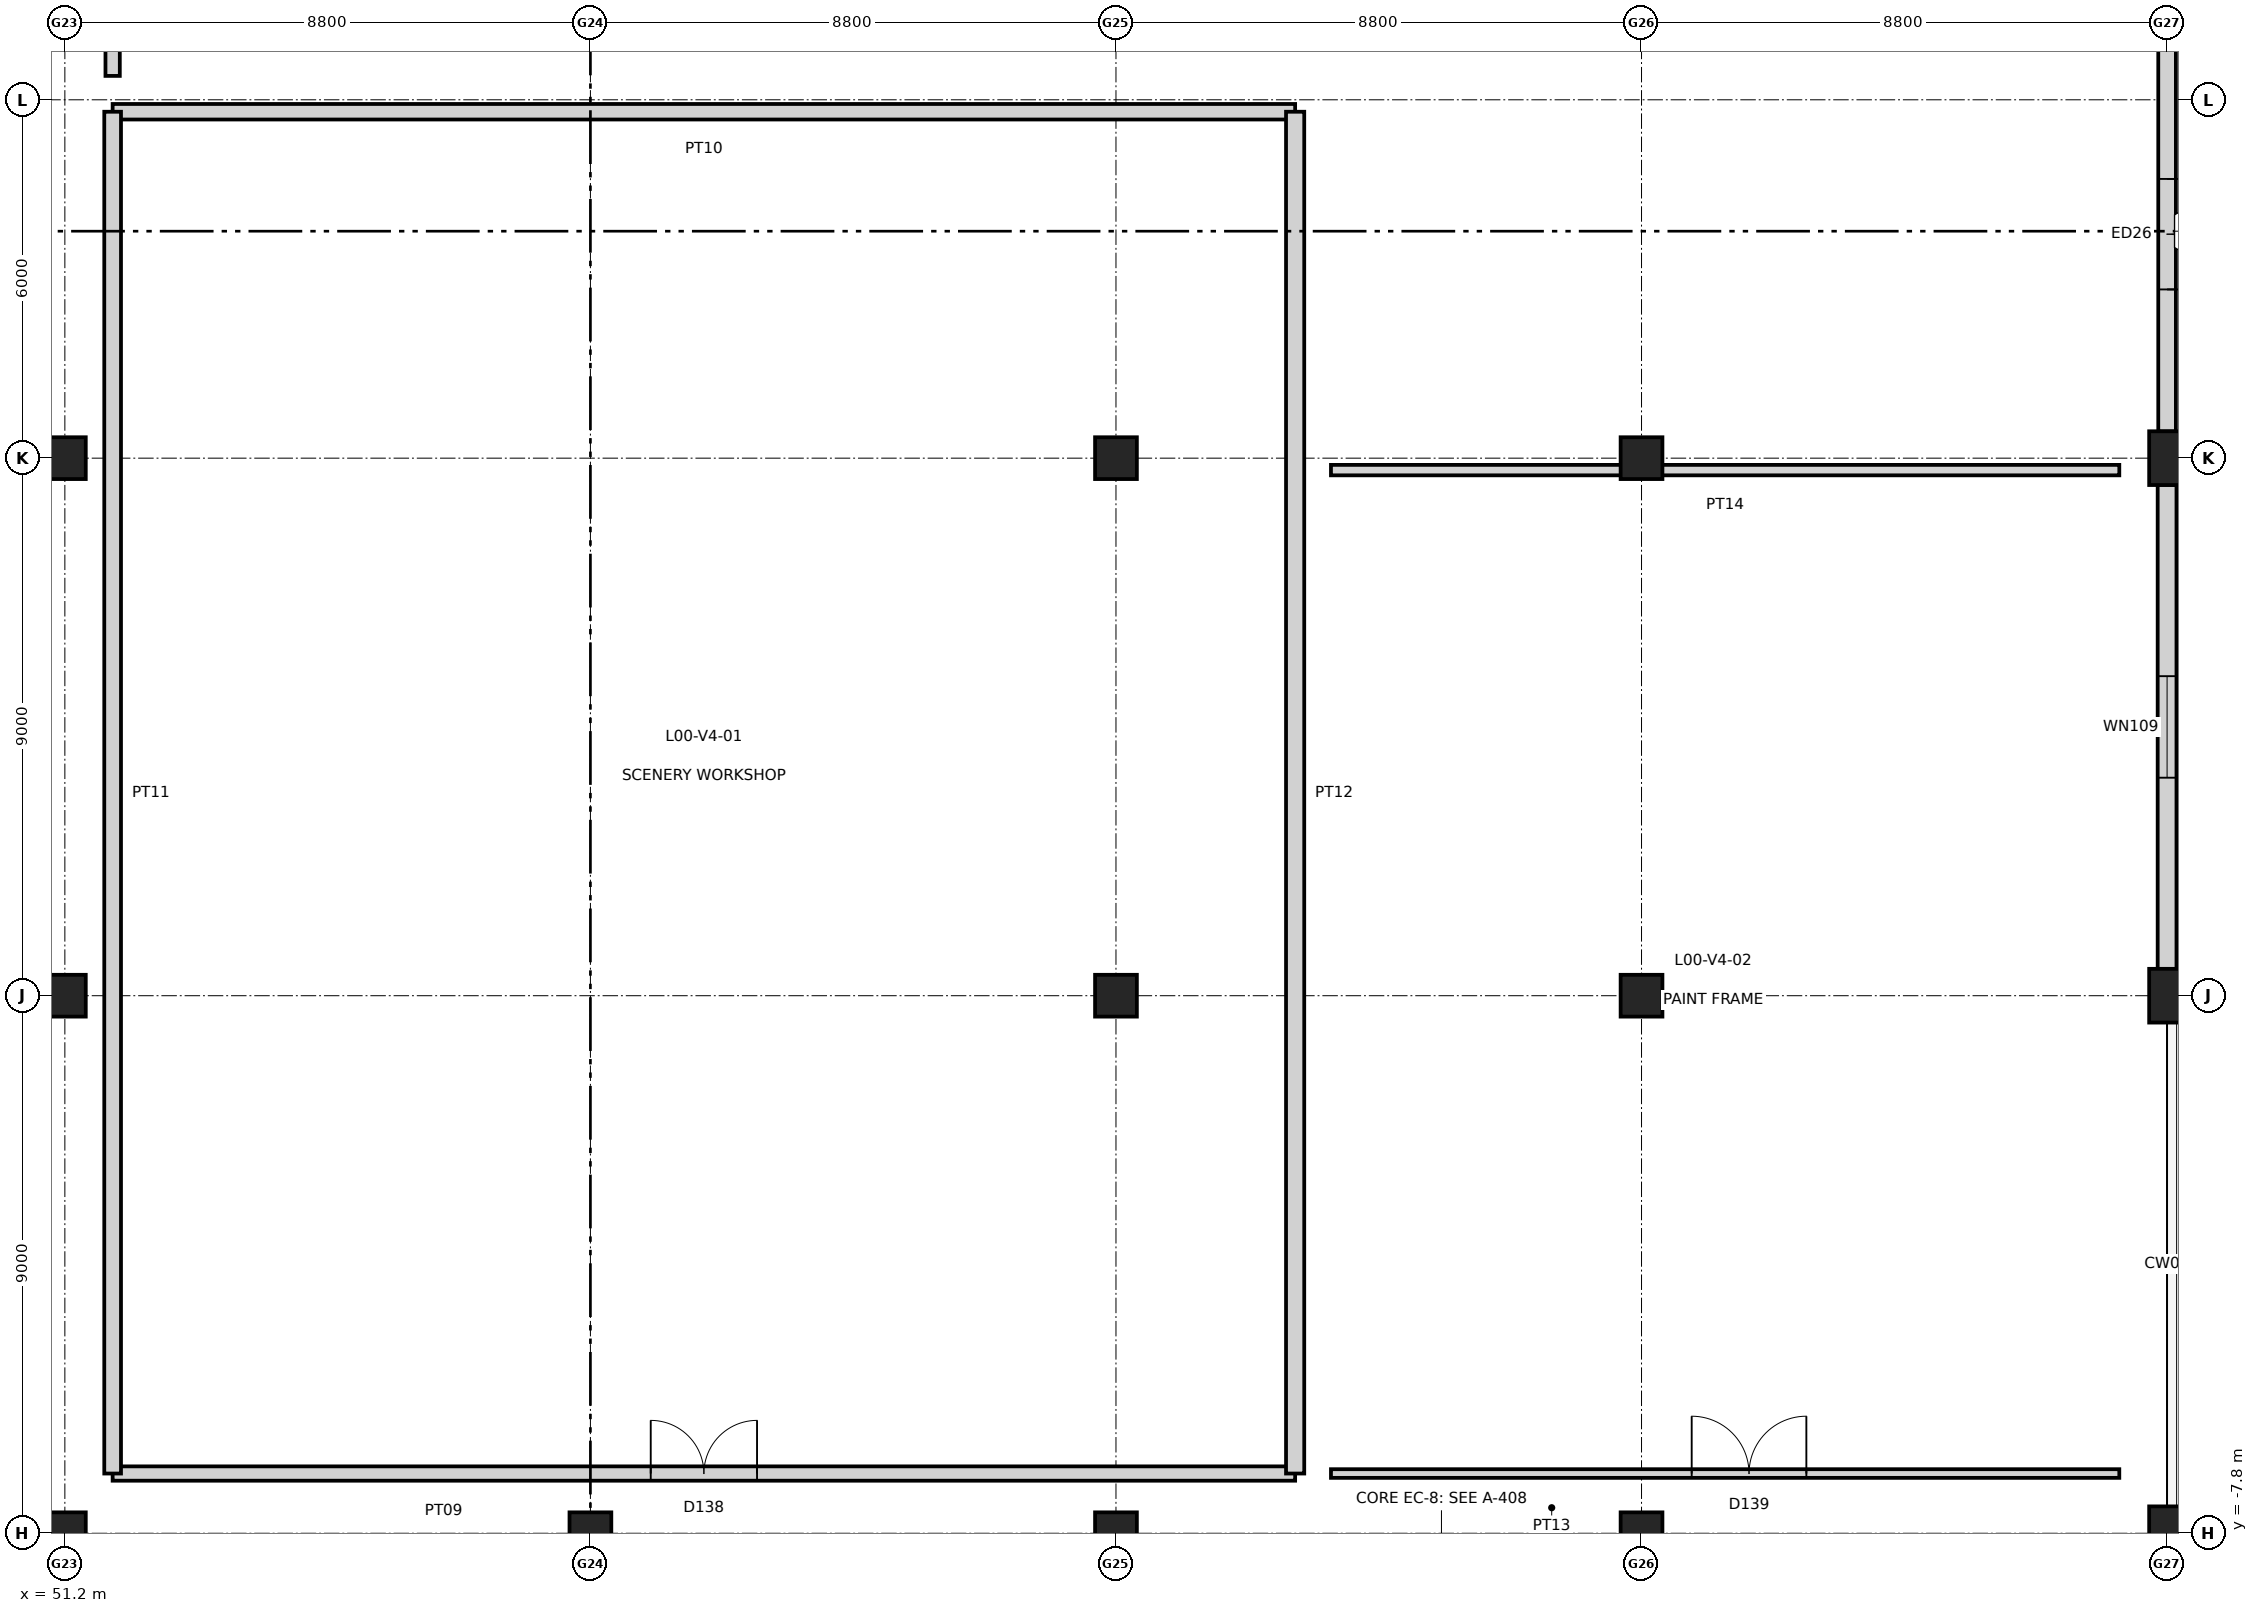
"""IFC4 building model, lengths in metres.
Left out: names, types, materials, properties, quantities, classifications, styles, units other than length and angle.
Written with IfcOpenShell. Run it as: python <this file> out.ifc"""

import sys

from ifc_helpers import new_model, si_unit, direction, frame, frame_2d, origin, origin_2d, place, context, subcontext, project, spatial, rectangle, extrude, element, fill, save


model = new_model("IFC4")
c1 = context("Model", 3, precision=1e-05, world=origin(), true_north=direction((0.0, 1.0)))
c2 = subcontext(c1, "Body", "Model", "MODEL_VIEW")
j1 = project(units=[si_unit("LENGTHUNIT", "METRE"), si_unit("PLANEANGLEUNIT", "RADIAN")], contexts=[c1])
p1 = place(None, origin())
s1 = spatial("IfcSite", under=j1, at=p1, CompositionType="ELEMENT")
p2 = place(p1, origin())
s2 = spatial("IfcBuilding", under=s1, at=p2, CompositionType="ELEMENT")
p3 = place(p2, origin())
s3 = spatial("IfcBuildingStorey", under=s2, at=p3, CompositionType="ELEMENT", Elevation=0.0)
for number, where, z_axis, x_axis in (
    (1, (51.2, -7.8, 0.0), (0.0, 0.0, 1.0), (1.0, 0.0, 0.0)),
    (2, (51.2, 1.2, 0.0), (0.0, 0.0, 1.0), (1.0, 0.0, 0.0)),
    (3, (51.2, 10.2, 0.0), (0.0, 0.0, 1.0), (1.0, 0.0, 0.0)),
    (4, (60.0, -7.8, 0.0), (0.0, 0.0, 1.0), (1.0, 0.0, 0.0)),
    (5, (68.8, -7.8, 0.0), (0.0, 0.0, 1.0), (1.0, 0.0, 0.0)),
    (6, (68.8, 1.2, 0.0), (0.0, 0.0, 1.0), (1.0, 0.0, 0.0)),
    (7, (68.8, 10.2, 0.0), (0.0, 0.0, 1.0), (1.0, 0.0, 0.0)),
    (8, (77.6, -7.8, 0.0), (0.0, 0.0, 1.0), (1.0, 0.0, 0.0)),
    (9, (77.6, 1.2, 0.0), (0.0, 0.0, 1.0), (1.0, 0.0, 0.0)),
    (10, (77.6, 10.2, 0.0), (0.0, 0.0, 1.0), (1.0, 0.0, 0.0)),
):
    element("IfcColumn", number, at=place(p3, frame(where, z_axis=z_axis, x_axis=x_axis)), inside=s3, PredefinedType="COLUMN", context=c2, shape_type="SweptSolid", body=[
        extrude(rectangle(XDim=0.7, YDim=0.7, at=origin_2d()), origin(), (0.0, 0.0, 1.0), 5.4),
    ])
for number, where, z_axis, x_axis in (
    (11, (86.4, -7.8, 0.0), (0.0, 0.0, 1.0), (1.0, 0.0, 0.0)),
    (12, (86.4, 1.2, 0.0), (0.0, 0.0, 1.0), (1.0, 0.0, 0.0)),
    (13, (86.4, 10.2, 0.0), (0.0, 0.0, 1.0), (1.0, 0.0, 0.0)),
):
    element("IfcColumn", number, at=place(p3, frame(where, z_axis=z_axis, x_axis=x_axis)), inside=s3, PredefinedType="COLUMN", context=c2, shape_type="SweptSolid", body=[
        extrude(rectangle(XDim=0.6, YDim=0.9, at=origin_2d()), origin(), (0.0, 0.0, 1.0), 5.4),
    ])
p4 = place(p3, frame((86.4, 17.252, 0.0), z_axis=(0.0, 0.0, 1.0), x_axis=(0.0, -1.0, 0.0)))
e14 = element("IfcWall", 14, at=p4, inside=s3, PredefinedType="STANDARD", context=c2, shape_type="SweptSolid", body=[
    extrude(rectangle(XDim=6.604, YDim=0.295, at=frame_2d((3.302, 0.0))), origin(), (0.0, 0.0, 1.0), 4.404),
])
p5 = place(p4, frame((2.377, 0.0, 0.0)))
e15 = element("IfcOpeningElement", 15, at=p5, cuts=e14, PredefinedType="OPENING", context=c2, shape_type="SweptSolid", body=[
    extrude(rectangle(XDim=1.85, YDim=2.25, at=frame_2d((0.925, 1.125))), frame((0.0, 0.157, 0.0), z_axis=(0.0, -1.0, 0.0), x_axis=(1.0, 0.0, 0.0)), (0.0, 0.0, 1.0), 0.315),
])
p6 = place(p3, frame((86.4, 9.752, 0.0), z_axis=(0.0, 0.0, 1.0), x_axis=(0.0, -1.0, 0.0)))
e16 = element("IfcWall", 16, at=p6, inside=s3, PredefinedType="STANDARD", context=c2, shape_type="SweptSolid", body=[
    extrude(rectangle(XDim=8.104, YDim=0.315, at=frame_2d((4.052, 0.0))), origin(), (0.0, 0.0, 1.0), 4.404),
])
p7 = place(p6, frame((3.202, 0.0, 0.85)))
e17 = element("IfcOpeningElement", 17, at=p7, cuts=e16, PredefinedType="OPENING", context=c2, shape_type="SweptSolid", body=[
    extrude(rectangle(XDim=1.7, YDim=1.75, at=frame_2d((0.85, 0.875))), frame((0.0, 0.167, 0.0), z_axis=(0.0, -1.0, 0.0), x_axis=(1.0, 0.0, 0.0)), (0.0, 0.0, 1.0), 0.335),
])
p8 = place(p3, frame((52.0, -6.8, 0.0), z_axis=(0.0, 0.0, 1.0), x_axis=(1.0, 0.0, 0.0)))
e18 = element("IfcWall", 18, at=p8, inside=s3, PredefinedType="PARTITIONING", context=c2, shape_type="SweptSolid", body=[
    extrude(rectangle(XDim=19.8, YDim=0.24, at=frame_2d((9.9, 0.0))), origin(), (0.0, 0.0, 1.0), 5.02),
])
p9 = place(p8, frame((9.01, 0.0, 0.0)))
e19 = element("IfcOpeningElement", 19, at=p9, cuts=e18, PredefinedType="OPENING", context=c2, shape_type="SweptSolid", body=[
    extrude(rectangle(XDim=1.78, YDim=2.3, at=frame_2d((0.89, 1.15))), frame((0.0, 0.13, 0.0), z_axis=(0.0, -1.0, 0.0), x_axis=(1.0, 0.0, 0.0)), (0.0, 0.0, 1.0), 0.26),
])
p10 = place(p3, frame((52.0, 16.0, 0.0), z_axis=(0.0, 0.0, 1.0), x_axis=(1.0, 0.0, 0.0)))
e20 = element("IfcWall", 20, at=p10, inside=s3, PredefinedType="PARTITIONING", context=c2, shape_type="SweptSolid", body=[
    extrude(rectangle(XDim=19.8, YDim=0.26, at=frame_2d((9.9, 0.0))), origin(), (0.0, 0.0, 1.0), 5.02),
])
p11 = place(p3, frame((52.0, -6.8, 0.0), z_axis=(0.0, 0.0, 1.0), x_axis=(0.0, 1.0, 0.0)))
e21 = element("IfcWall", 21, at=p11, inside=s3, PredefinedType="PARTITIONING", context=c2, shape_type="SweptSolid", body=[
    extrude(rectangle(XDim=22.8, YDim=0.28, at=frame_2d((11.4, 0.0))), origin(), (0.0, 0.0, 1.0), 5.02),
])
p12 = place(p3, frame((71.8, -6.8, 0.0), z_axis=(0.0, 0.0, 1.0), x_axis=(0.0, 1.0, 0.0)))
e22 = element("IfcWall", 22, at=p12, inside=s3, PredefinedType="PARTITIONING", context=c2, shape_type="SweptSolid", body=[
    extrude(rectangle(XDim=22.8, YDim=0.305, at=frame_2d((11.4, 0.0))), origin(), (0.0, 0.0, 1.0), 4.552),
])
p13 = place(p3, frame((72.4, -6.8, 0.0), z_axis=(0.0, 0.0, 1.0), x_axis=(1.0, 0.0, 0.0)))
e23 = element("IfcWall", 23, at=p13, inside=s3, PredefinedType="PARTITIONING", context=c2, shape_type="SweptSolid", body=[
    extrude(rectangle(XDim=13.2, YDim=0.145, at=frame_2d((6.6, 0.0))), origin(), (0.0, 0.0, 1.0), 5.02),
])
p14 = place(p13, frame((6.04, 0.0, 0.0)))
e24 = element("IfcOpeningElement", 24, at=p14, cuts=e23, PredefinedType="OPENING", context=c2, shape_type="SweptSolid", body=[
    extrude(rectangle(XDim=1.92, YDim=2.4, at=frame_2d((0.96, 1.2))), frame((0.0, 0.083, 0.0), z_axis=(0.0, -1.0, 0.0), x_axis=(1.0, 0.0, 0.0)), (0.0, 0.0, 1.0), 0.165),
])
p15 = place(p3, frame((72.4, 10.0, 0.0), z_axis=(0.0, 0.0, 1.0), x_axis=(1.0, 0.0, 0.0)))
e25 = element("IfcWall", 25, at=p15, inside=s3, PredefinedType="PARTITIONING", context=c2, shape_type="SweptSolid", body=[
    extrude(rectangle(XDim=13.2, YDim=0.175, at=frame_2d((6.6, 0.0))), origin(), (0.0, 0.0, 1.0), 3.665),
])
p16 = place(p3, frame((52.0, 16.6, 0.0), z_axis=(0.0, 0.0, 1.0), x_axis=(0.0, 1.0, 0.0)))
e26 = element("IfcWall", 26, at=p16, inside=s3, PredefinedType="PARTITIONING", context=c2, shape_type="SweptSolid", body=[
    extrude(rectangle(XDim=16.2, YDim=0.24, at=frame_2d((8.1, 0.0))), origin(), (0.0, 0.0, 1.0), 5.02),
])
p17 = place(p16, frame((3.478, 0.0, 0.0)))
e27 = element("IfcOpeningElement", 27, at=p17, cuts=e26, PredefinedType="OPENING", context=c2, shape_type="SweptSolid", body=[
    extrude(rectangle(XDim=2.25, YDim=2.45, at=frame_2d((1.125, 1.225))), frame((0.0, 0.13, 0.0), z_axis=(0.0, -1.0, 0.0), x_axis=(1.0, 0.0, 0.0)), (0.0, 0.0, 1.0), 0.26),
])
p18 = place(p5, origin())
e28 = element("IfcDoor", 28, at=p18, inside=s3, OperationType="DOUBLE_DOOR_SINGLE_SWING", PredefinedType="DOOR", context=c2, shape_type="SweptSolid", body=[
    extrude(rectangle(XDim=1.85, YDim=2.25, at=frame_2d((0.925, 1.125))), frame((0.0, 0.025, 0.0), z_axis=(0.0, -1.0, 0.0), x_axis=(1.0, 0.0, 0.0)), (0.0, 0.0, 1.0), 0.05),
])
fill(e15, e28)
p19 = place(p7, origin())
e29 = element("IfcWindow", 29, at=p19, inside=s3, PartitioningType="SINGLE_PANEL", PredefinedType="WINDOW", context=c2, shape_type="SweptSolid", body=[
    extrude(rectangle(XDim=1.7, YDim=1.75, at=frame_2d((0.85, 0.875))), frame((0.0, 0.03, 0.0), z_axis=(0.0, -1.0, 0.0), x_axis=(1.0, 0.0, 0.0)), (0.0, 0.0, 1.0), 0.06),
])
fill(e17, e29)
p20 = place(p9, origin())
e30 = element("IfcDoor", 30, at=p20, inside=s3, OperationType="DOUBLE_DOOR_SINGLE_SWING", PredefinedType="DOOR", context=c2, shape_type="SweptSolid", body=[
    extrude(rectangle(XDim=1.78, YDim=2.3, at=frame_2d((0.89, 1.15))), frame((0.0, 0.025, 0.0), z_axis=(0.0, -1.0, 0.0), x_axis=(1.0, 0.0, 0.0)), (0.0, 0.0, 1.0), 0.05),
])
fill(e19, e30)
p21 = place(p14, origin())
e31 = element("IfcDoor", 31, at=p21, inside=s3, OperationType="DOUBLE_DOOR_SINGLE_SWING", PredefinedType="DOOR", context=c2, shape_type="SweptSolid", body=[
    extrude(rectangle(XDim=1.92, YDim=2.4, at=frame_2d((0.96, 1.2))), frame((0.0, 0.025, 0.0), z_axis=(0.0, -1.0, 0.0), x_axis=(1.0, 0.0, 0.0)), (0.0, 0.0, 1.0), 0.05),
])
fill(e24, e31)
save(model, sys.argv[1])
